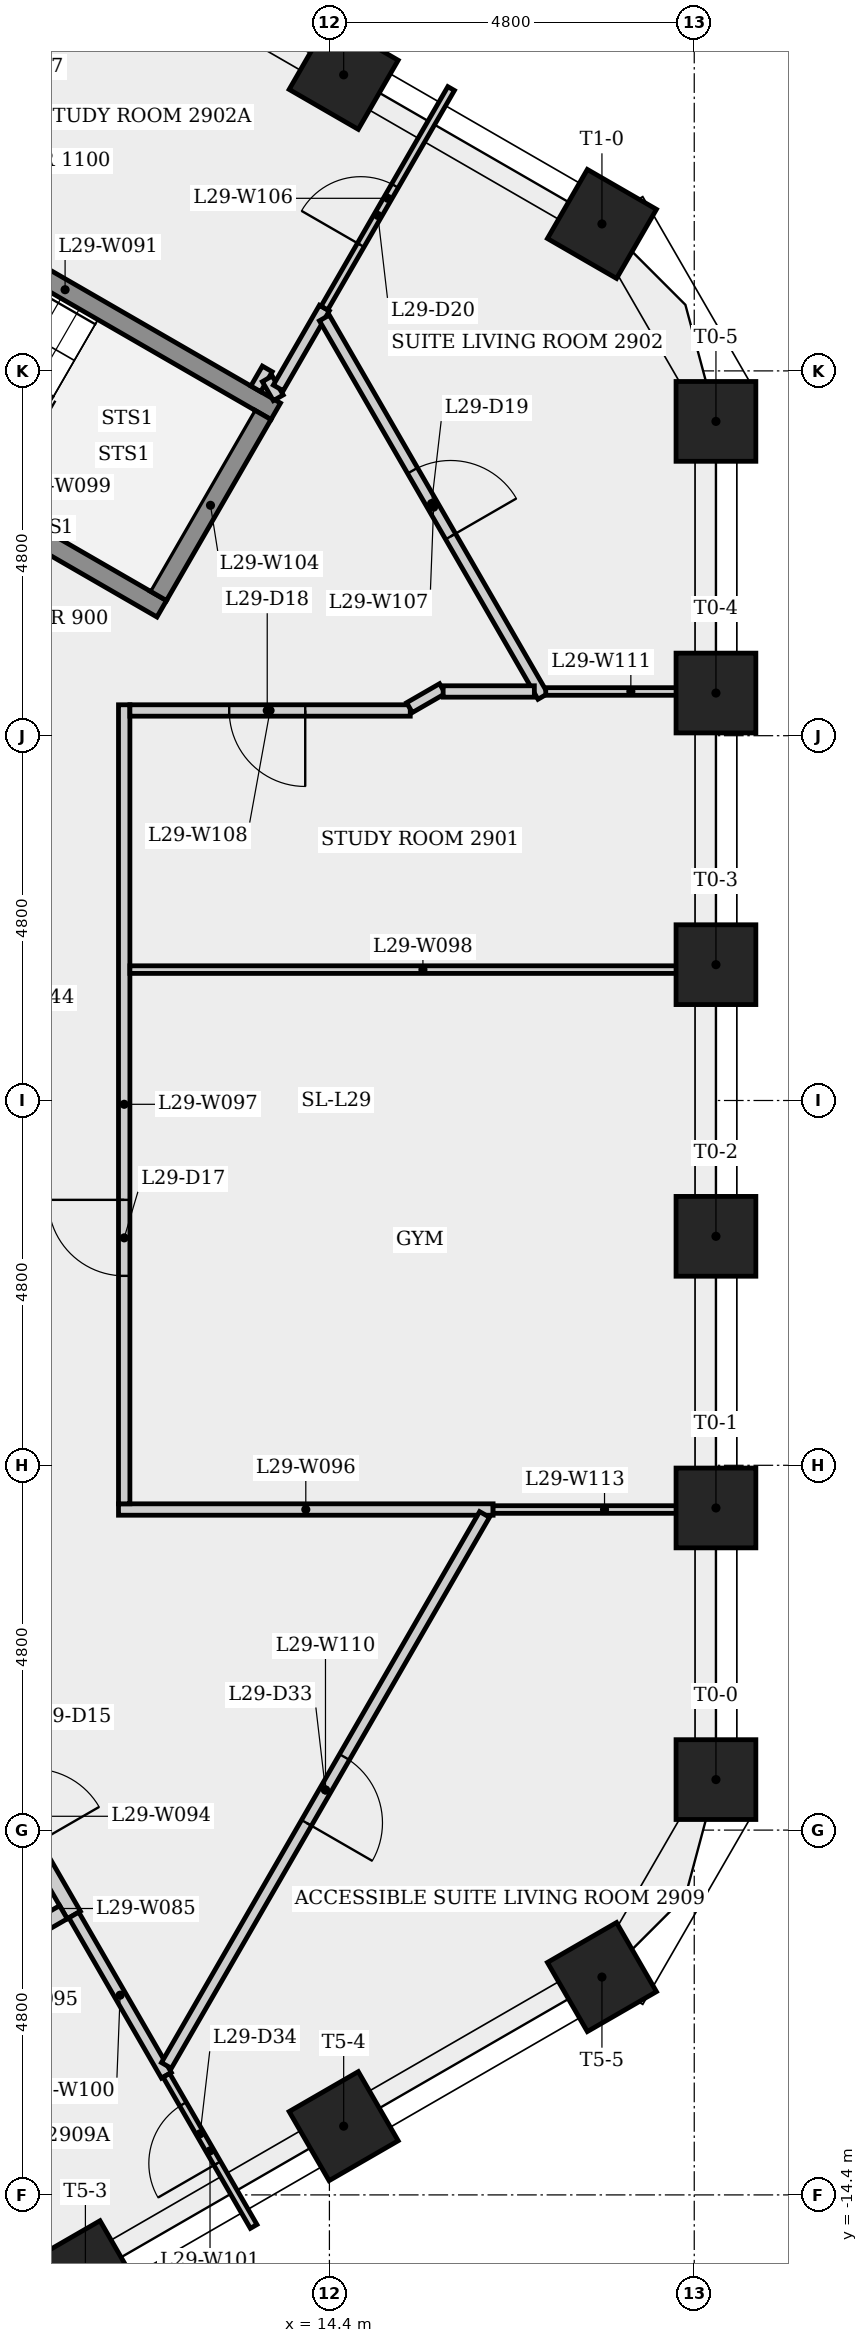
"""IFC4 building model, lengths in metres.
Left out: names, types, materials, properties, quantities, classifications, styles, units other than length and angle.
Written with IfcOpenShell. Run it as: python <this file> out.ifc"""

import sys

from ifc_helpers import new_model, si_unit, direction, frame, frame_2d, origin, origin_2d, place, context, subcontext, project, spatial, rectangle, extrude, element, fill, save


model = new_model("IFC4")
c1 = context("Model", 3, precision=1e-05, world=origin(), true_north=direction((0.0, 1.0)))
c2 = subcontext(c1, "Body", "Model", "MODEL_VIEW")
j1 = project(units=[si_unit("LENGTHUNIT", "METRE"), si_unit("PLANEANGLEUNIT", "RADIAN")], contexts=[c1])
p1 = place(None, origin())
s1 = spatial("IfcSite", under=j1, at=p1, CompositionType="ELEMENT")
p2 = place(p1, origin())
s2 = spatial("IfcBuilding", under=s1, at=p2, CompositionType="ELEMENT")
p3 = place(p2, frame((0.0, 0.0, 110.3)))
s3 = spatial("IfcBuildingStorey", under=s2, at=p3, CompositionType="ELEMENT", Elevation=110.3)
for number, where, z_axis, x_axis in (
    (1, (19.486, -8.936, 0.0), (0.0, 0.0, 1.0), (1.0, 0.0, 0.0)),
    (2, (19.486, -5.361, 0.0), (0.0, 0.0, 1.0), (1.0, 0.0, 0.0)),
    (3, (19.486, -1.787, 0.0), (0.0, 0.0, 1.0), (1.0, 0.0, 0.0)),
    (4, (19.486, 1.787, 0.0), (0.0, 0.0, 1.0), (1.0, 0.0, 0.0)),
    (5, (19.486, 5.361, 0.0), (0.0, 0.0, 1.0), (1.0, 0.0, 0.0)),
    (6, (19.486, 8.936, 0.0), (0.0, 0.0, 1.0), (1.0, 0.0, 0.0)),
    (7, (17.986, 11.533, 0.0), (0.0, 0.0, 1.0), (0.5, 0.866, 0.0)),
    (8, (14.588, 13.495, 0.0), (0.0, 0.0, 1.0), (0.5, 0.866, 0.0)),
    (9, (11.189, -15.457, 0.0), (0.0, 0.0, 1.0), (0.5, -0.866, 0.0)),
    (10, (14.588, -13.495, 0.0), (0.0, 0.0, 1.0), (0.5, -0.866, 0.0)),
    (11, (17.986, -11.533, 0.0), (0.0, 0.0, 1.0), (0.5, -0.866, 0.0)),
):
    element("IfcColumn", number, at=place(p3, frame(where, z_axis=z_axis, x_axis=x_axis)), inside=s3, PredefinedType="COLUMN", context=c2, shape_type="SweptSolid", body=[
        extrude(rectangle(XDim=1.05, YDim=1.05, at=origin_2d()), origin(), (0.0, 0.0, 1.0), 3.4),
    ])
p4 = place(p3, frame((8.151, 12.268, 0.0), z_axis=(0.0, 0.0, 1.0), x_axis=(0.866025499775, -0.499999833739, 0.0)))
e12 = element("IfcWall", 12, at=p4, inside=s3, PredefinedType="SHEAR", context=c2, shape_type="SweptSolid", body=[
    extrude(rectangle(XDim=6.4, YDim=0.25, at=frame_2d((3.2, 0.0))), origin(), (0.0, 0.0, 1.0), 3.05),
])
p5 = place(p3, frame((9.537, -8.119, 0.0), z_axis=(0.0, 0.0, 1.0), x_axis=(0.499990139034, -0.866031096941, 0.0)))
e13 = element("IfcWall", 13, at=p5, inside=s3, PredefinedType="PARTITIONING", context=c2, shape_type="SweptSolid", body=[
    extrude(rectangle(XDim=3.0, YDim=0.2, at=frame_2d((1.5, 0.0))), origin(), (0.0, 0.0, 1.0), 3.05),
])
p6 = place(p5, frame((0.935, 0.0, 0.0)))
e14 = element("IfcOpeningElement", 14, at=p6, cuts=e13, PredefinedType="OPENING", context=c2, shape_type="SweptSolid", body=[
    extrude(rectangle(XDim=1.0, YDim=2.1, at=frame_2d((0.5, 1.05))), frame((0.0, 0.11, 0.0), z_axis=(0.0, -1.0, 0.0), x_axis=(1.0, 0.0, 0.0)), (0.0, 0.0, 1.0), 0.22),
])
p7 = place(p3, frame((10.901, -10.681, 0.0), z_axis=(0.0, 0.0, 1.0), x_axis=(-0.866007538022, -0.500030943131, 0.0)))
e15 = element("IfcWall", 15, at=p7, inside=s3, PredefinedType="PARTITIONING", context=c2, shape_type="SweptSolid", body=[
    extrude(rectangle(XDim=2.375, YDim=0.2, at=frame_2d((1.188, 0.0))), origin(), (0.0, 0.0, 1.0), 3.05),
])
p8 = place(p3, frame((11.625, -5.382, 0.0), z_axis=(0.0, 0.0, 1.0), x_axis=(1.0, 0.0, 0.0)))
e16 = element("IfcWall", 16, at=p8, inside=s3, PredefinedType="PARTITIONING", context=c2, shape_type="SweptSolid", body=[
    extrude(rectangle(XDim=4.929, YDim=0.15, at=frame_2d((2.464, 0.0))), origin(), (0.0, 0.0, 1.0), 3.05),
])
p9 = place(p3, frame((11.7, -5.307, 0.0), z_axis=(0.0, 0.0, 1.0), x_axis=(0.0, 1.0, 0.0)))
e17 = element("IfcWall", 17, at=p9, inside=s3, PredefinedType="PARTITIONING", context=c2, shape_type="SweptSolid", body=[
    extrude(rectangle(XDim=10.514, YDim=0.15, at=frame_2d((5.257, 0.0))), origin(), (0.0, 0.0, 1.0), 3.05),
])
p10 = place(p9, frame((3.0, 0.0, 0.0)))
e18 = element("IfcOpeningElement", 18, at=p10, cuts=e17, PredefinedType="OPENING", context=c2, shape_type="SweptSolid", body=[
    extrude(rectangle(XDim=1.0, YDim=2.1, at=frame_2d((0.5, 1.05))), frame((0.0, 0.085, 0.0), z_axis=(0.0, -1.0, 0.0), x_axis=(1.0, 0.0, 0.0)), (0.0, 0.0, 1.0), 0.17),
])
p11 = place(p3, frame((11.775, 1.722, 0.0), z_axis=(0.0, 0.0, 1.0), x_axis=(1.0, 0.0, 0.0)))
e19 = element("IfcWall", 19, at=p11, inside=s3, PredefinedType="PARTITIONING", context=c2, shape_type="SweptSolid", body=[
    extrude(rectangle(XDim=7.711, YDim=0.1, at=frame_2d((3.855, 0.0))), origin(), (0.0, 0.0, 1.0), 3.05),
])
p12 = place(p3, frame((12.194, 6.47, 0.0), z_axis=(0.0, 0.0, 1.0), x_axis=(-0.866025499775, 0.499999833739, 0.0)))
e20 = element("IfcWall", 20, at=p12, inside=s3, PredefinedType="SHEAR", context=c2, shape_type="SweptSolid", body=[
    extrude(rectangle(XDim=6.4, YDim=0.25, at=frame_2d((3.2, 0.0))), origin(), (0.0, 0.0, 1.0), 3.05),
])
p13 = place(p12, frame((5.25, 0.0, 0.0)))
e21 = element("IfcOpeningElement", 21, at=p13, cuts=e20, PredefinedType="OPENING", context=c2, shape_type="SweptSolid", body=[
    extrude(rectangle(XDim=1.0, YDim=2.1, at=frame_2d((0.5, 1.05))), frame((0.0, 0.135, 0.0), z_axis=(0.0, -1.0, 0.0), x_axis=(1.0, 0.0, 0.0)), (0.0, 0.0, 1.0), 0.27),
])
p14 = place(p3, frame((12.255, -12.827, 0.0), z_axis=(0.0, 0.0, 1.0), x_axis=(-0.500008743658, 0.866020355572, 0.0)))
e22 = element("IfcWall", 22, at=p14, inside=s3, PredefinedType="PARTITIONING", context=c2, shape_type="SweptSolid", body=[
    extrude(rectangle(XDim=2.436, YDim=0.15, at=frame_2d((1.218, 0.0))), origin(), (0.0, 0.0, 1.0), 3.05),
])
p15 = place(p3, frame((13.403, -14.815, 0.0), z_axis=(0.0, 0.0, 1.0), x_axis=(-0.500004737999, 0.866022668282, 0.0)))
e23 = element("IfcWall", 23, at=p15, inside=s3, PredefinedType="PARTITIONING", context=c2, shape_type="SweptSolid", body=[
    extrude(rectangle(XDim=2.296, YDim=0.1, at=frame_2d((1.148, 0.0))), origin(), (0.0, 0.0, 1.0), 3.05),
])
p16 = place(p15, frame((0.958, 0.0, 0.0)))
e24 = element("IfcOpeningElement", 24, at=p16, cuts=e23, PredefinedType="OPENING", context=c2, shape_type="SweptSolid", body=[
    extrude(rectangle(XDim=0.9, YDim=2.1, at=frame_2d((0.45, 1.05))), frame((0.0, 0.06, 0.0), z_axis=(0.0, -1.0, 0.0), x_axis=(1.0, 0.0, 0.0)), (0.0, 0.0, 1.0), 0.12),
])
p17 = place(p3, frame((13.431, 9.364, 0.0), z_axis=(0.0, 0.0, 1.0), x_axis=(0.49995513091, 0.866051307416, 0.0)))
e25 = element("IfcWall", 25, at=p17, inside=s3, PredefinedType="PARTITIONING", context=c2, shape_type="SweptSolid", body=[
    extrude(rectangle(XDim=0.303, YDim=0.15, at=frame_2d((0.151, 0.0))), origin(), (0.0, 0.0, 1.0), 3.05),
])
p18 = place(p3, frame((13.583, 9.496, 0.0), z_axis=(0.0, 0.0, 1.0), x_axis=(0.499868889286, -0.866101087359, 0.0)))
e26 = element("IfcWall", 26, at=p18, inside=s3, PredefinedType="PARTITIONING", context=c2, shape_type="SweptSolid", body=[
    extrude(rectangle(XDim=0.289, YDim=0.15, at=frame_2d((0.144, 0.0))), origin(), (0.0, 0.0, 1.0), 3.05),
])
p19 = place(p3, frame((13.523, 9.022, 0.0), z_axis=(0.0, 0.0, 1.0), x_axis=(-0.500034990121, -0.866005201286, 0.0)))
e27 = element("IfcWall", 27, at=p19, inside=s3, PredefinedType="SHEAR", context=c2, shape_type="SweptSolid", body=[
    extrude(rectangle(XDim=2.75, YDim=0.25, at=frame_2d((1.375, 0.0))), origin(), (0.0, 0.0, 1.0), 3.05),
])
p20 = place(p3, frame((13.727, 9.376, 0.0), z_axis=(0.0, 0.0, 1.0), x_axis=(0.500012742938, 0.866018046521, 0.0)))
e28 = element("IfcWall", 28, at=p20, inside=s3, PredefinedType="PARTITIONING", context=c2, shape_type="SweptSolid", body=[
    extrude(rectangle(XDim=1.213, YDim=0.15, at=frame_2d((0.607, 0.0))), origin(), (0.0, 0.0, 1.0), 3.05),
])
p21 = place(p3, frame((14.334, 10.427, 0.0), z_axis=(0.0, 0.0, 1.0), x_axis=(0.499997052475, 0.866027105532, 0.0)))
e29 = element("IfcWall", 29, at=p21, inside=s3, PredefinedType="PARTITIONING", context=c2, shape_type="SweptSolid", body=[
    extrude(rectangle(XDim=3.335, YDim=0.1, at=frame_2d((1.667, 0.0))), origin(), (0.0, 0.0, 1.0), 3.05),
])
p22 = place(p21, frame((0.957, 0.0, 0.0)))
e30 = element("IfcOpeningElement", 30, at=p22, cuts=e29, PredefinedType="OPENING", context=c2, shape_type="SweptSolid", body=[
    extrude(rectangle(XDim=0.9, YDim=2.1, at=frame_2d((0.45, 1.05))), frame((0.0, 0.06, 0.0), z_axis=(0.0, -1.0, 0.0), x_axis=(1.0, 0.0, 0.0)), (0.0, 0.0, 1.0), 0.12),
])
p23 = place(p3, frame((14.334, 10.297, 0.0), z_axis=(0.0, 0.0, 1.0), x_axis=(0.500006661652, -0.866021557644, 0.0)))
e31 = element("IfcWall", 31, at=p23, inside=s3, PredefinedType="PARTITIONING", context=c2, shape_type="SweptSolid", body=[
    extrude(rectangle(XDim=5.75, YDim=0.15, at=frame_2d((2.875, 0.0))), origin(), (0.0, 0.0, 1.0), 3.05),
])
p24 = place(p23, frame((2.32, 0.0, 0.0)))
e32 = element("IfcOpeningElement", 32, at=p24, cuts=e31, PredefinedType="OPENING", context=c2, shape_type="SweptSolid", body=[
    extrude(rectangle(XDim=1.0, YDim=2.1, at=frame_2d((0.5, 1.05))), frame((0.0, 0.085, 0.0), z_axis=(0.0, -1.0, 0.0), x_axis=(1.0, 0.0, 0.0)), (0.0, 0.0, 1.0), 0.17),
])
p25 = place(p3, frame((15.464, 5.132, 0.0), z_axis=(0.0, 0.0, 1.0), x_axis=(-1.0, 0.0, 0.0)))
e33 = element("IfcWall", 33, at=p25, inside=s3, PredefinedType="PARTITIONING", context=c2, shape_type="SweptSolid", body=[
    extrude(rectangle(XDim=3.689, YDim=0.15, at=frame_2d((1.844, 0.0))), origin(), (0.0, 0.0, 1.0), 3.05),
])
p26 = place(p25, frame((1.382, 0.0, 0.0)))
e34 = element("IfcOpeningElement", 34, at=p26, cuts=e33, PredefinedType="OPENING", context=c2, shape_type="SweptSolid", body=[
    extrude(rectangle(XDim=1.0, YDim=2.1, at=frame_2d((0.5, 1.05))), frame((0.0, 0.085, 0.0), z_axis=(0.0, -1.0, 0.0), x_axis=(1.0, 0.0, 0.0)), (0.0, 0.0, 1.0), 0.17),
])
p27 = place(p3, frame((15.887, 5.419, 0.0), z_axis=(0.0, 0.0, 1.0), x_axis=(-0.866071776036, -0.499919672301, 0.0)))
e35 = element("IfcWall", 35, at=p27, inside=s3, PredefinedType="PARTITIONING", context=c2, shape_type="SweptSolid", body=[
    extrude(rectangle(XDim=0.5, YDim=0.15, at=frame_2d((0.25, 0.0))), origin(), (0.0, 0.0, 1.0), 3.05),
])
p28 = place(p3, frame((16.441, -5.447, 0.0), z_axis=(0.0, 0.0, 1.0), x_axis=(-0.500000140117, -0.866025322888, 0.0)))
e36 = element("IfcWall", 36, at=p28, inside=s3, PredefinedType="PARTITIONING", context=c2, shape_type="SweptSolid", body=[
    extrude(rectangle(XDim=8.372, YDim=0.15, at=frame_2d((4.186, 0.0))), origin(), (0.0, 0.0, 1.0), 3.05),
])
p29 = place(p28, frame((3.686, 0.0, 0.0)))
e37 = element("IfcOpeningElement", 37, at=p29, cuts=e36, PredefinedType="OPENING", context=c2, shape_type="SweptSolid", body=[
    extrude(rectangle(XDim=1.0, YDim=2.1, at=frame_2d((0.5, 1.05))), frame((0.0, 0.085, 0.0), z_axis=(0.0, -1.0, 0.0), x_axis=(1.0, 0.0, 0.0)), (0.0, 0.0, 1.0), 0.17),
])
p30 = place(p3, frame((17.246, 5.382, 0.0), z_axis=(0.0, 0.0, 1.0), x_axis=(1.0, 0.0, 0.0)))
e38 = element("IfcWall", 38, at=p30, inside=s3, PredefinedType="PARTITIONING", context=c2, shape_type="SweptSolid", body=[
    extrude(rectangle(XDim=2.239, YDim=0.1, at=frame_2d((1.12, 0.0))), origin(), (0.0, 0.0, 1.0), 3.05),
])
p31 = place(p3, frame((17.096, 5.382, 0.0), z_axis=(0.0, 0.0, 1.0), x_axis=(-1.0, 0.0, 0.0)))
e39 = element("IfcWall", 39, at=p31, inside=s3, PredefinedType="PARTITIONING", context=c2, shape_type="SweptSolid", body=[
    extrude(rectangle(XDim=1.2, YDim=0.15, at=frame_2d((0.6, 0.0))), origin(), (0.0, 0.0, 1.0), 3.05),
])
p32 = place(p3, frame((19.486, -5.382, 0.0), z_axis=(0.0, 0.0, 1.0), x_axis=(-1.0, 0.0, 0.0)))
e40 = element("IfcWall", 40, at=p32, inside=s3, PredefinedType="PARTITIONING", context=c2, shape_type="SweptSolid", body=[
    extrude(rectangle(XDim=2.932, YDim=0.1, at=frame_2d((1.466, 0.0))), origin(), (0.0, 0.0, 1.0), 3.05),
])
p33 = place(p10, origin())
e41 = element("IfcDoor", 41, at=p33, inside=s3, OperationType="SINGLE_SWING_RIGHT", PredefinedType="DOOR", context=c2, shape_type="SweptSolid", body=[
    extrude(rectangle(XDim=1.0, YDim=2.1, at=frame_2d((0.5, 1.05))), frame((0.0, 0.025, 0.0), z_axis=(0.0, -1.0, 0.0), x_axis=(1.0, 0.0, 0.0)), (0.0, 0.0, 1.0), 0.05),
])
fill(e18, e41)
p34 = place(p26, origin())
e42 = element("IfcDoor", 42, at=p34, inside=s3, OperationType="SINGLE_SWING_LEFT", PredefinedType="DOOR", context=c2, shape_type="SweptSolid", body=[
    extrude(rectangle(XDim=1.0, YDim=2.1, at=frame_2d((0.5, 1.05))), frame((0.0, 0.025, 0.0), z_axis=(0.0, -1.0, 0.0), x_axis=(1.0, 0.0, 0.0)), (0.0, 0.0, 1.0), 0.05),
])
fill(e34, e42)
p35 = place(p24, origin())
e43 = element("IfcDoor", 43, at=p35, inside=s3, OperationType="SINGLE_SWING_RIGHT", PredefinedType="DOOR", context=c2, shape_type="SweptSolid", body=[
    extrude(rectangle(XDim=1.0, YDim=2.1, at=frame_2d((0.5, 1.05))), frame((0.0, 0.025, 0.0), z_axis=(0.0, -1.0, 0.0), x_axis=(1.0, 0.0, 0.0)), (0.0, 0.0, 1.0), 0.05),
])
fill(e32, e43)
p36 = place(p22, origin())
e44 = element("IfcDoor", 44, at=p36, inside=s3, OperationType="SINGLE_SWING_LEFT", PredefinedType="DOOR", context=c2, shape_type="SweptSolid", body=[
    extrude(rectangle(XDim=0.9, YDim=2.1, at=frame_2d((0.45, 1.05))), frame((0.0, 0.025, 0.0), z_axis=(0.0, -1.0, 0.0), x_axis=(1.0, 0.0, 0.0)), (0.0, 0.0, 1.0), 0.05),
])
fill(e30, e44)
p37 = place(p29, origin())
e45 = element("IfcDoor", 45, at=p37, inside=s3, OperationType="SINGLE_SWING_RIGHT", PredefinedType="DOOR", context=c2, shape_type="SweptSolid", body=[
    extrude(rectangle(XDim=1.0, YDim=2.1, at=frame_2d((0.5, 1.05))), frame((0.0, 0.025, 0.0), z_axis=(0.0, -1.0, 0.0), x_axis=(1.0, 0.0, 0.0)), (0.0, 0.0, 1.0), 0.05),
])
fill(e37, e45)
p38 = place(p16, origin())
e46 = element("IfcDoor", 46, at=p38, inside=s3, OperationType="SINGLE_SWING_LEFT", PredefinedType="DOOR", context=c2, shape_type="SweptSolid", body=[
    extrude(rectangle(XDim=0.9, YDim=2.1, at=frame_2d((0.45, 1.05))), frame((0.0, 0.025, 0.0), z_axis=(0.0, -1.0, 0.0), x_axis=(1.0, 0.0, 0.0)), (0.0, 0.0, 1.0), 0.05),
])
fill(e24, e46)
save(model, sys.argv[1])
